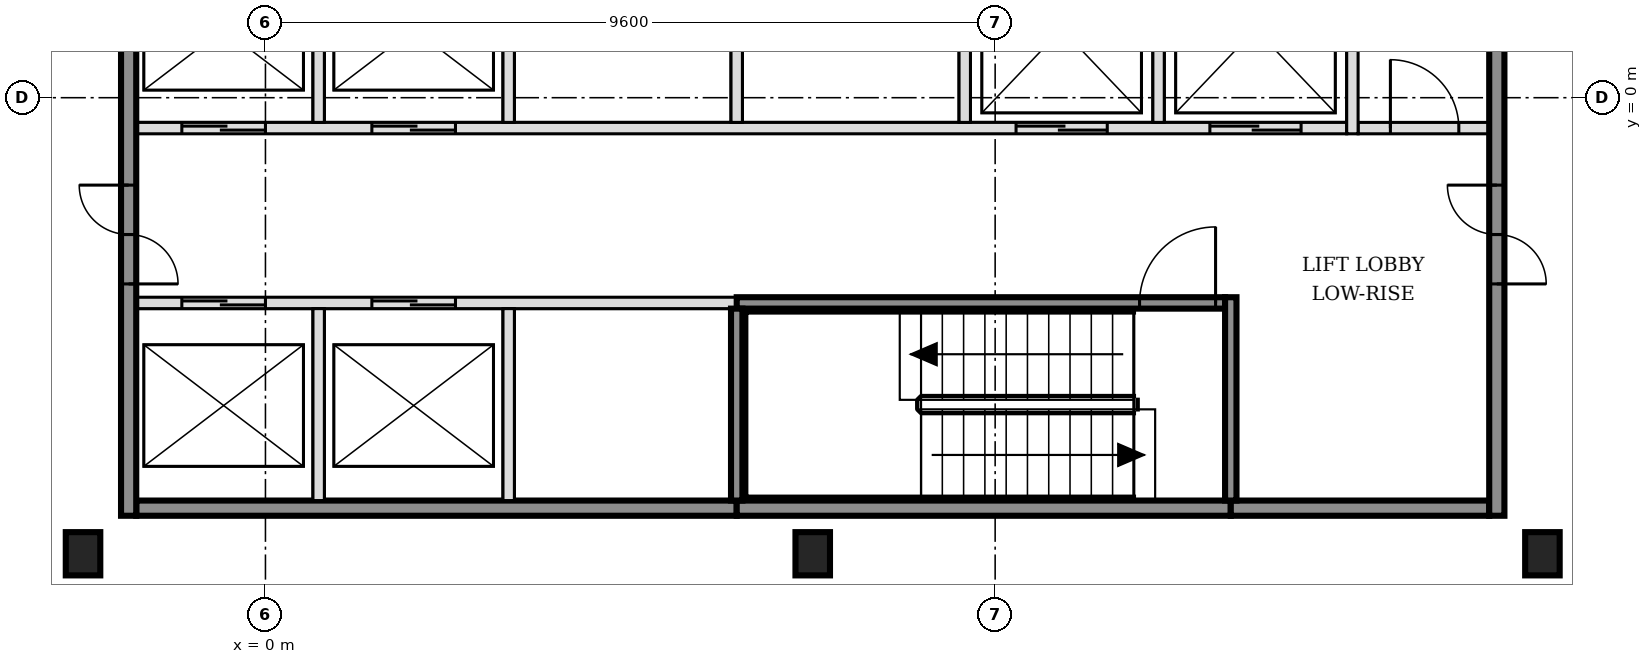
"""IFC4 building model, lengths in metres.
Left out: names, types, materials, properties, quantities, classifications, styles, units other than length and angle.
Written with IfcOpenShell. Run it as: python <this file> out.ifc"""

import sys

from ifc_helpers import new_model, si_unit, direction, frame, frame_2d, origin, origin_2d, place, context, subcontext, project, spatial, rectangle, i_section, extrude, element, fill, save


model = new_model("IFC4")
c1 = context("Model", 3, precision=1e-05, world=origin(), true_north=direction((0.0, 1.0)))
c2 = subcontext(c1, "Body", "Model", "MODEL_VIEW")
j1 = project(units=[si_unit("LENGTHUNIT", "METRE"), si_unit("PLANEANGLEUNIT", "RADIAN")], contexts=[c1])
p1 = place(None, origin())
s1 = spatial("IfcSite", under=j1, at=p1, CompositionType="ELEMENT")
p2 = place(p1, origin())
s2 = spatial("IfcBuilding", under=s1, at=p2, CompositionType="ELEMENT")
p3 = place(p2, frame((0.0, 0.0, 61.8)))
s3 = spatial("IfcBuildingStorey", under=s2, at=p3, CompositionType="ELEMENT", Elevation=61.8)
for number, where, z_axis, x_axis in (
    (1, (-2.4, -6.0, -0.15), (0.0, 0.0, 1.0), (1.0, 0.0, 0.0)),
    (2, (7.2, -6.0, -0.15), (0.0, 0.0, 1.0), (1.0, 0.0, 0.0)),
    (3, (16.8, -6.0, -0.15), (0.0, 0.0, 1.0), (1.0, 0.0, 0.0)),
):
    element("IfcColumn", number, at=place(p3, frame(where, z_axis=z_axis, x_axis=x_axis)), inside=s3, PredefinedType="COLUMN", context=c2, shape_type="SweptSolid", body=[
        extrude(i_section(OverallWidth=0.454, OverallDepth=0.569, WebThickness=0.078, FlangeThickness=0.125, FilletRadius=0.015, at=origin_2d()), origin(), (0.0, 0.0, 1.0), 3.6),
    ])
p4 = place(p3, frame((-1.7, -5.4, 0.0), z_axis=(0.0, 0.0, 1.0), x_axis=(1.0, 0.0, 0.0)))
e4 = element("IfcWall", 4, at=p4, inside=s3, PredefinedType="SOLIDWALL", context=c2, shape_type="SweptSolid", body=[
    extrude(rectangle(XDim=7.9, YDim=0.2, at=frame_2d((3.95, 0.0))), origin(), (0.0, 0.0, 1.0), 3.45),
])
p5 = place(p3, frame((6.2, -5.4, 0.0), z_axis=(0.0, 0.0, 1.0), x_axis=(1.0, 0.0, 0.0)))
e5 = element("IfcWall", 5, at=p5, inside=s3, PredefinedType="SOLIDWALL", context=c2, shape_type="SweptSolid", body=[
    extrude(rectangle(XDim=6.5, YDim=0.2, at=frame_2d((3.25, 0.0))), origin(), (0.0, 0.0, 1.0), 3.45),
])
p6 = place(p3, frame((12.7, -5.4, 0.0), z_axis=(0.0, 0.0, 1.0), x_axis=(1.0, 0.0, 0.0)))
e6 = element("IfcWall", 6, at=p6, inside=s3, PredefinedType="SOLIDWALL", context=c2, shape_type="SweptSolid", body=[
    extrude(rectangle(XDim=3.4, YDim=0.2, at=frame_2d((1.7, 0.0))), origin(), (0.0, 0.0, 1.0), 3.45),
])
p7 = place(p3, frame((-1.7, -2.7, 0.0), z_axis=(0.0, 0.0, 1.0), x_axis=(1.0, 0.0, 0.0)))
e7 = element("IfcWall", 7, at=p7, inside=s3, PredefinedType="SOLIDWALL", context=c2, shape_type="SweptSolid", body=[
    extrude(rectangle(XDim=7.9, YDim=0.15, at=frame_2d((3.95, 0.0))), origin(), (0.0, 0.0, 1.0), 3.45),
])
p8 = place(p7, frame((0.6, 0.0, 0.0)))
e8 = element("IfcOpeningElement", 8, at=p8, cuts=e7, PredefinedType="OPENING", context=c2, shape_type="SweptSolid", body=[
    extrude(rectangle(XDim=1.1, YDim=2.1, at=frame_2d((0.55, 1.05))), frame((0.0, 0.085, 0.0), z_axis=(0.0, -1.0, 0.0), x_axis=(1.0, 0.0, 0.0)), (0.0, 0.0, 1.0), 0.17),
])
p9 = place(p7, frame((3.1, 0.0, 0.0)))
e9 = element("IfcOpeningElement", 9, at=p9, cuts=e7, PredefinedType="OPENING", context=c2, shape_type="SweptSolid", body=[
    extrude(rectangle(XDim=1.1, YDim=2.1, at=frame_2d((0.55, 1.05))), frame((0.0, 0.085, 0.0), z_axis=(0.0, -1.0, 0.0), x_axis=(1.0, 0.0, 0.0)), (0.0, 0.0, 1.0), 0.17),
])
p10 = place(p3, frame((6.2, -2.7, 0.0), z_axis=(0.0, 0.0, 1.0), x_axis=(1.0, 0.0, 0.0)))
e10 = element("IfcWall", 10, at=p10, inside=s3, PredefinedType="SOLIDWALL", context=c2, shape_type="SweptSolid", body=[
    extrude(rectangle(XDim=6.425, YDim=0.15, at=frame_2d((3.212, 0.0))), origin(), (0.0, 0.0, 1.0), 3.45),
])
p11 = place(p10, frame((5.3, 0.0, 0.0)))
e11 = element("IfcOpeningElement", 11, at=p11, cuts=e10, PredefinedType="OPENING", context=c2, shape_type="SweptSolid", body=[
    extrude(rectangle(XDim=1.0, YDim=2.1, at=frame_2d((0.5, 1.05))), frame((0.0, 0.085, 0.0), z_axis=(0.0, -1.0, 0.0), x_axis=(1.0, 0.0, 0.0)), (0.0, 0.0, 1.0), 0.17),
])
p12 = place(p3, frame((-1.7, -0.4, 0.0), z_axis=(0.0, 0.0, 1.0), x_axis=(1.0, 0.0, 0.0)))
e12 = element("IfcWall", 12, at=p12, inside=s3, PredefinedType="SOLIDWALL", context=c2, shape_type="SweptSolid", body=[
    extrude(rectangle(XDim=15.925, YDim=0.15, at=frame_2d((7.962, 0.0))), origin(), (0.0, 0.0, 1.0), 3.45),
])
p13 = place(p12, frame((0.6, 0.0, 0.0)))
e13 = element("IfcOpeningElement", 13, at=p13, cuts=e12, PredefinedType="OPENING", context=c2, shape_type="SweptSolid", body=[
    extrude(rectangle(XDim=1.1, YDim=2.1, at=frame_2d((0.55, 1.05))), frame((0.0, 0.085, 0.0), z_axis=(0.0, -1.0, 0.0), x_axis=(1.0, 0.0, 0.0)), (0.0, 0.0, 1.0), 0.17),
])
p14 = place(p12, frame((3.1, 0.0, 0.0)))
e14 = element("IfcOpeningElement", 14, at=p14, cuts=e12, PredefinedType="OPENING", context=c2, shape_type="SweptSolid", body=[
    extrude(rectangle(XDim=1.1, YDim=2.1, at=frame_2d((0.55, 1.05))), frame((0.0, 0.085, 0.0), z_axis=(0.0, -1.0, 0.0), x_axis=(1.0, 0.0, 0.0)), (0.0, 0.0, 1.0), 0.17),
])
p15 = place(p12, frame((11.575, 0.0, 0.0)))
e15 = element("IfcOpeningElement", 15, at=p15, cuts=e12, PredefinedType="OPENING", context=c2, shape_type="SweptSolid", body=[
    extrude(rectangle(XDim=1.2, YDim=2.1, at=frame_2d((0.6, 1.05))), frame((0.0, 0.085, 0.0), z_axis=(0.0, -1.0, 0.0), x_axis=(1.0, 0.0, 0.0)), (0.0, 0.0, 1.0), 0.17),
])
p16 = place(p12, frame((14.125, 0.0, 0.0)))
e16 = element("IfcOpeningElement", 16, at=p16, cuts=e12, PredefinedType="OPENING", context=c2, shape_type="SweptSolid", body=[
    extrude(rectangle(XDim=1.2, YDim=2.1, at=frame_2d((0.6, 1.05))), frame((0.0, 0.085, 0.0), z_axis=(0.0, -1.0, 0.0), x_axis=(1.0, 0.0, 0.0)), (0.0, 0.0, 1.0), 0.17),
])
p17 = place(p3, frame((14.375, -0.4, 0.0), z_axis=(0.0, 0.0, 1.0), x_axis=(1.0, 0.0, 0.0)))
e17 = element("IfcWall", 17, at=p17, inside=s3, PredefinedType="PARTITIONING", context=c2, shape_type="SweptSolid", body=[
    extrude(rectangle(XDim=1.725, YDim=0.15, at=frame_2d((0.863, 0.0))), origin(), (0.0, 0.0, 1.0), 3.45),
])
p18 = place(p17, frame((0.425, 0.0, 0.0)))
e18 = element("IfcOpeningElement", 18, at=p18, cuts=e17, PredefinedType="OPENING", context=c2, shape_type="SweptSolid", body=[
    extrude(rectangle(XDim=0.9, YDim=2.1, at=frame_2d((0.45, 1.05))), frame((0.0, 0.085, 0.0), z_axis=(0.0, -1.0, 0.0), x_axis=(1.0, 0.0, 0.0)), (0.0, 0.0, 1.0), 0.17),
])
p19 = place(p3, frame((-1.8, -5.5, 0.0), z_axis=(0.0, 0.0, 1.0), x_axis=(0.0, 1.0, 0.0)))
e19 = element("IfcWall", 19, at=p19, inside=s3, PredefinedType="SOLIDWALL", context=c2, shape_type="SweptSolid", body=[
    extrude(rectangle(XDim=15.8, YDim=0.2, at=frame_2d((7.9, 0.0))), origin(), (0.0, 0.0, 1.0), 3.45),
])
p20 = place(p19, frame((3.05, 0.0, 0.0)))
e20 = element("IfcOpeningElement", 20, at=p20, cuts=e19, PredefinedType="OPENING", context=c2, shape_type="SweptSolid", body=[
    extrude(rectangle(XDim=1.3, YDim=2.1, at=frame_2d((0.65, 1.05))), frame((0.0, 0.11, 0.0), z_axis=(0.0, -1.0, 0.0), x_axis=(1.0, 0.0, 0.0)), (0.0, 0.0, 1.0), 0.22),
])
p21 = place(p19, frame((11.45, 0.0, 0.0)))
e21 = element("IfcOpeningElement", 21, at=p21, cuts=e19, PredefinedType="OPENING", context=c2, shape_type="SweptSolid", body=[
    extrude(rectangle(XDim=1.3, YDim=2.1, at=frame_2d((0.65, 1.05))), frame((0.0, 0.11, 0.0), z_axis=(0.0, -1.0, 0.0), x_axis=(1.0, 0.0, 0.0)), (0.0, 0.0, 1.0), 0.22),
])
p22 = place(p3, frame((0.7, -5.3, 0.0), z_axis=(0.0, 0.0, 1.0), x_axis=(0.0, 1.0, 0.0)))
e22 = element("IfcWall", 22, at=p22, inside=s3, PredefinedType="SOLIDWALL", context=c2, shape_type="SweptSolid", body=[
    extrude(rectangle(XDim=2.525, YDim=0.15, at=frame_2d((1.263, 0.0))), origin(), (0.0, 0.0, 1.0), 3.45),
])
p23 = place(p3, frame((0.7, -0.325, 0.0), z_axis=(0.0, 0.0, 1.0), x_axis=(0.0, 1.0, 0.0)))
e23 = element("IfcWall", 23, at=p23, inside=s3, PredefinedType="SOLIDWALL", context=c2, shape_type="SweptSolid", body=[
    extrude(rectangle(XDim=2.45, YDim=0.15, at=frame_2d((1.225, 0.0))), origin(), (0.0, 0.0, 1.0), 3.45),
])
p24 = place(p3, frame((3.2, -5.3, 0.0), z_axis=(0.0, 0.0, 1.0), x_axis=(0.0, 1.0, 0.0)))
e24 = element("IfcWall", 24, at=p24, inside=s3, PredefinedType="SOLIDWALL", context=c2, shape_type="SweptSolid", body=[
    extrude(rectangle(XDim=2.525, YDim=0.15, at=frame_2d((1.263, 0.0))), origin(), (0.0, 0.0, 1.0), 3.45),
])
p25 = place(p3, frame((3.2, -0.325, 0.0), z_axis=(0.0, 0.0, 1.0), x_axis=(0.0, 1.0, 0.0)))
e25 = element("IfcWall", 25, at=p25, inside=s3, PredefinedType="SOLIDWALL", context=c2, shape_type="SweptSolid", body=[
    extrude(rectangle(XDim=2.45, YDim=0.15, at=frame_2d((1.225, 0.0))), origin(), (0.0, 0.0, 1.0), 3.45),
])
p26 = place(p3, frame((6.2, -5.3, 0.0), z_axis=(0.0, 0.0, 1.0), x_axis=(0.0, 1.0, 0.0)))
e26 = element("IfcWall", 26, at=p26, inside=s3, PredefinedType="SOLIDWALL", context=c2, shape_type="SweptSolid", body=[
    extrude(rectangle(XDim=2.525, YDim=0.15, at=frame_2d((1.263, 0.0))), origin(), (0.0, 0.0, 1.0), 3.45),
])
for number, where, z_axis, x_axis in (
    (27, (6.2, -0.325, 0.0), (0.0, 0.0, 1.0), (0.0, 1.0, 0.0)),
    (28, (9.2, -0.325, 0.0), (0.0, 0.0, 1.0), (0.0, 1.0, 0.0)),
    (29, (11.75, -0.325, 0.0), (0.0, 0.0, 1.0), (0.0, 1.0, 0.0)),
):
    element("IfcWall", number, at=place(p3, frame(where, z_axis=z_axis, x_axis=x_axis)), inside=s3, PredefinedType="SOLIDWALL", context=c2, shape_type="SweptSolid", body=[
        extrude(rectangle(XDim=2.45, YDim=0.15, at=frame_2d((1.225, 0.0))), origin(), (0.0, 0.0, 1.0), 3.45),
    ])
p27 = place(p3, frame((12.7, -5.3, 0.0), z_axis=(0.0, 0.0, 1.0), x_axis=(0.0, 1.0, 0.0)))
e30 = element("IfcWall", 30, at=p27, inside=s3, PredefinedType="SOLIDWALL", context=c2, shape_type="SweptSolid", body=[
    extrude(rectangle(XDim=2.675, YDim=0.15, at=frame_2d((1.337, 0.0))), origin(), (0.0, 0.0, 1.0), 3.45),
])
p28 = place(p3, frame((14.3, -0.475, 0.0), z_axis=(0.0, 0.0, 1.0), x_axis=(0.0, 1.0, 0.0)))
e31 = element("IfcWall", 31, at=p28, inside=s3, PredefinedType="SOLIDWALL", context=c2, shape_type="SweptSolid", body=[
    extrude(rectangle(XDim=2.75, YDim=0.15, at=frame_2d((1.375, 0.0))), origin(), (0.0, 0.0, 1.0), 3.45),
])
p29 = place(p3, frame((16.2, -5.5, 0.0), z_axis=(0.0, 0.0, 1.0), x_axis=(0.0, 1.0, 0.0)))
e32 = element("IfcWall", 32, at=p29, inside=s3, PredefinedType="SOLIDWALL", context=c2, shape_type="SweptSolid", body=[
    extrude(rectangle(XDim=15.8, YDim=0.2, at=frame_2d((7.9, 0.0))), origin(), (0.0, 0.0, 1.0), 3.45),
])
p30 = place(p29, frame((3.05, 0.0, 0.0)))
e33 = element("IfcOpeningElement", 33, at=p30, cuts=e32, PredefinedType="OPENING", context=c2, shape_type="SweptSolid", body=[
    extrude(rectangle(XDim=1.3, YDim=2.1, at=frame_2d((0.65, 1.05))), frame((0.0, 0.11, 0.0), z_axis=(0.0, -1.0, 0.0), x_axis=(1.0, 0.0, 0.0)), (0.0, 0.0, 1.0), 0.22),
])
p31 = place(p29, frame((11.45, 0.0, 0.0)))
e34 = element("IfcOpeningElement", 34, at=p31, cuts=e32, PredefinedType="OPENING", context=c2, shape_type="SweptSolid", body=[
    extrude(rectangle(XDim=1.3, YDim=2.1, at=frame_2d((0.65, 1.05))), frame((0.0, 0.11, 0.0), z_axis=(0.0, -1.0, 0.0), x_axis=(1.0, 0.0, 0.0)), (0.0, 0.0, 1.0), 0.22),
])
p32 = place(p8, origin())
e35 = element("IfcDoor", 35, at=p32, inside=s3, OperationType="DOUBLE_DOOR_SLIDING", PredefinedType="DOOR", context=c2, shape_type="SweptSolid", body=[
    extrude(rectangle(XDim=1.1, YDim=2.1, at=frame_2d((0.55, 1.05))), frame((0.0, 0.025, 0.0), z_axis=(0.0, -1.0, 0.0), x_axis=(1.0, 0.0, 0.0)), (0.0, 0.0, 1.0), 0.05),
])
fill(e8, e35)
p33 = place(p9, origin())
e36 = element("IfcDoor", 36, at=p33, inside=s3, OperationType="DOUBLE_DOOR_SLIDING", PredefinedType="DOOR", context=c2, shape_type="SweptSolid", body=[
    extrude(rectangle(XDim=1.1, YDim=2.1, at=frame_2d((0.55, 1.05))), frame((0.0, 0.025, 0.0), z_axis=(0.0, -1.0, 0.0), x_axis=(1.0, 0.0, 0.0)), (0.0, 0.0, 1.0), 0.05),
])
fill(e9, e36)
p34 = place(p13, origin())
e37 = element("IfcDoor", 37, at=p34, inside=s3, OperationType="DOUBLE_DOOR_SLIDING", PredefinedType="DOOR", context=c2, shape_type="SweptSolid", body=[
    extrude(rectangle(XDim=1.1, YDim=2.1, at=frame_2d((0.55, 1.05))), frame((0.0, 0.025, 0.0), z_axis=(0.0, -1.0, 0.0), x_axis=(1.0, 0.0, 0.0)), (0.0, 0.0, 1.0), 0.05),
])
fill(e13, e37)
p35 = place(p14, origin())
e38 = element("IfcDoor", 38, at=p35, inside=s3, OperationType="DOUBLE_DOOR_SLIDING", PredefinedType="DOOR", context=c2, shape_type="SweptSolid", body=[
    extrude(rectangle(XDim=1.1, YDim=2.1, at=frame_2d((0.55, 1.05))), frame((0.0, 0.025, 0.0), z_axis=(0.0, -1.0, 0.0), x_axis=(1.0, 0.0, 0.0)), (0.0, 0.0, 1.0), 0.05),
])
fill(e14, e38)
p36 = place(p15, origin())
e39 = element("IfcDoor", 39, at=p36, inside=s3, OperationType="DOUBLE_DOOR_SLIDING", PredefinedType="DOOR", context=c2, shape_type="SweptSolid", body=[
    extrude(rectangle(XDim=1.2, YDim=2.1, at=frame_2d((0.6, 1.05))), frame((0.0, 0.025, 0.0), z_axis=(0.0, -1.0, 0.0), x_axis=(1.0, 0.0, 0.0)), (0.0, 0.0, 1.0), 0.05),
])
fill(e15, e39)
p37 = place(p16, origin())
e40 = element("IfcDoor", 40, at=p37, inside=s3, OperationType="DOUBLE_DOOR_SLIDING", PredefinedType="DOOR", context=c2, shape_type="SweptSolid", body=[
    extrude(rectangle(XDim=1.2, YDim=2.1, at=frame_2d((0.6, 1.05))), frame((0.0, 0.025, 0.0), z_axis=(0.0, -1.0, 0.0), x_axis=(1.0, 0.0, 0.0)), (0.0, 0.0, 1.0), 0.05),
])
fill(e16, e40)
p38 = place(p11, origin())
e41 = element("IfcDoor", 41, at=p38, inside=s3, OperationType="SINGLE_SWING_RIGHT", PredefinedType="DOOR", context=c2, shape_type="SweptSolid", body=[
    extrude(rectangle(XDim=1.0, YDim=2.1, at=frame_2d((0.5, 1.05))), frame((0.0, 0.025, 0.0), z_axis=(0.0, -1.0, 0.0), x_axis=(1.0, 0.0, 0.0)), (0.0, 0.0, 1.0), 0.05),
])
fill(e11, e41)
p39 = place(p20, origin())
e42 = element("IfcDoor", 42, at=p39, inside=s3, OperationType="DOUBLE_DOOR_SINGLE_SWING", PredefinedType="DOOR", context=c2, shape_type="SweptSolid", body=[
    extrude(rectangle(XDim=1.3, YDim=2.1, at=frame_2d((0.65, 1.05))), frame((0.0, 0.025, 0.0), z_axis=(0.0, -1.0, 0.0), x_axis=(1.0, 0.0, 0.0)), (0.0, 0.0, 1.0), 0.05),
])
fill(e20, e42)
p40 = place(p30, origin())
e43 = element("IfcDoor", 43, at=p40, inside=s3, OperationType="DOUBLE_DOOR_SINGLE_SWING", PredefinedType="DOOR", context=c2, shape_type="SweptSolid", body=[
    extrude(rectangle(XDim=1.3, YDim=2.1, at=frame_2d((0.65, 1.05))), frame((0.0, 0.025, 0.0), z_axis=(0.0, -1.0, 0.0), x_axis=(1.0, 0.0, 0.0)), (0.0, 0.0, 1.0), 0.05),
])
fill(e33, e43)
p41 = place(p18, origin())
e44 = element("IfcDoor", 44, at=p41, inside=s3, OperationType="SINGLE_SWING_LEFT", PredefinedType="DOOR", context=c2, shape_type="SweptSolid", body=[
    extrude(rectangle(XDim=0.9, YDim=2.1, at=frame_2d((0.45, 1.05))), frame((0.0, 0.025, 0.0), z_axis=(0.0, -1.0, 0.0), x_axis=(1.0, 0.0, 0.0)), (0.0, 0.0, 1.0), 0.05),
])
fill(e18, e44)
save(model, sys.argv[1])
